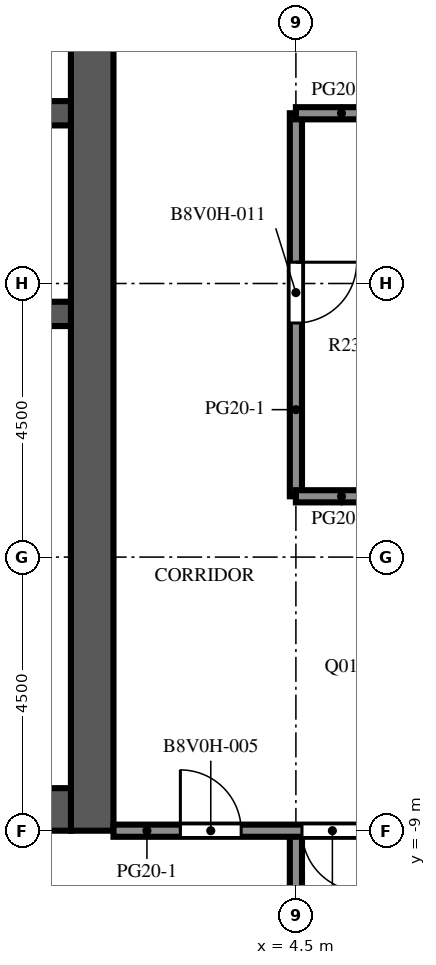
"""IFC4 building model, lengths in metres.
Left out: names, types, materials, properties, quantities, classifications, styles, units other than length and angle.
Written with IfcOpenShell. Run it as: python <this file> out.ifc"""

import sys

from ifc_helpers import new_model, si_unit, direction, frame, frame_2d, origin, place, context, subcontext, project, spatial, rectangle, extrude, element, fill, save


model = new_model("IFC4")
c1 = context("Model", 3, precision=1e-05, world=origin(), true_north=direction((0.0, 1.0)))
c2 = subcontext(c1, "Body", "Model", "MODEL_VIEW")
j1 = project(units=[si_unit("LENGTHUNIT", "METRE"), si_unit("PLANEANGLEUNIT", "RADIAN")], contexts=[c1])
p1 = place(None, origin())
s1 = spatial("IfcSite", under=j1, at=p1, CompositionType="ELEMENT")
p2 = place(p1, origin())
s2 = spatial("IfcBuilding", under=s1, at=p2, CompositionType="ELEMENT")
p3 = place(p2, frame((0.0, 0.0, 266.3)))
s3 = spatial("IfcBuildingStorey", under=s2, at=p3, CompositionType="ELEMENT", Elevation=266.3)
p4 = place(p3, frame((1.15, -9.0, 0.0), z_axis=(0.0, 0.0, 1.0), x_axis=(0.0, 1.0, 0.0)))
e1 = element("IfcWall", 1, at=p4, inside=s3, PredefinedType="SHEAR", context=c2, shape_type="SweptSolid", body=[
    extrude(rectangle(XDim=27.5, YDim=0.7, at=frame_2d((13.75, 0.0))), origin(), (0.0, 0.0, 1.0), 4.1),
])
p5 = place(p4, frame((12.55, 0.0, 0.0)))
e2 = element("IfcOpeningElement", 2, at=p5, cuts=e1, PredefinedType="OPENING", context=c2, shape_type="SweptSolid", body=[
    extrude(rectangle(XDim=2.4, YDim=2.4, at=frame_2d((1.2, 1.2))), frame((0.0, 0.36, 0.0), z_axis=(0.0, -1.0, 0.0), x_axis=(1.0, 0.0, 0.0)), (0.0, 0.0, 1.0), 0.72),
])
p6 = place(p4, frame((3.788, 0.0, 0.0)))
e3 = element("IfcOpeningElement", 3, at=p6, cuts=e1, PredefinedType="OPENING", context=c2, shape_type="SweptSolid", body=[
    extrude(rectangle(XDim=0.968, YDim=2.1, at=frame_2d((0.484, 1.05))), frame((0.0, 0.36, 0.0), z_axis=(0.0, -1.0, 0.0), x_axis=(1.0, 0.0, 0.0)), (0.0, 0.0, 1.0), 0.72),
])
p7 = place(p4, frame((23.54, 0.0, 0.0)))
e4 = element("IfcOpeningElement", 4, at=p7, cuts=e1, PredefinedType="OPENING", context=c2, shape_type="SweptSolid", body=[
    extrude(rectangle(XDim=1.2, YDim=2.1, at=frame_2d((0.6, 1.05))), frame((0.0, 0.36, 0.0), z_axis=(0.0, -1.0, 0.0), x_axis=(1.0, 0.0, 0.0)), (0.0, 0.0, 1.0), 0.72),
])
p8 = place(p3, frame((-9.8, -8.65, 0.0), z_axis=(0.0, 0.0, 1.0), x_axis=(1.0, 0.0, 0.0)))
e5 = element("IfcWall", 5, at=p8, inside=s3, PredefinedType="SHEAR", context=c2, shape_type="SweptSolid", body=[
    extrude(rectangle(XDim=10.6, YDim=0.7, at=frame_2d((5.3, 0.0))), origin(), (0.0, 0.0, 1.0), 4.1),
])
p9 = place(p3, frame((-9.8, -0.5, 0.0), z_axis=(0.0, 0.0, 1.0), x_axis=(1.0, 0.0, 0.0)))
e6 = element("IfcWall", 6, at=p9, inside=s3, PredefinedType="SHEAR", context=c2, shape_type="SweptSolid", body=[
    extrude(rectangle(XDim=10.6, YDim=0.4, at=frame_2d((5.3, 0.0))), origin(), (0.0, 0.0, 1.0), 4.1),
])
p10 = place(p3, frame((-9.8, 2.8, 0.0), z_axis=(0.0, 0.0, 1.0), x_axis=(1.0, 0.0, 0.0)))
e7 = element("IfcWall", 7, at=p10, inside=s3, PredefinedType="SHEAR", context=c2, shape_type="SweptSolid", body=[
    extrude(rectangle(XDim=10.6, YDim=0.4, at=frame_2d((5.3, 0.0))), origin(), (0.0, 0.0, 1.0), 4.1),
])
p11 = place(p10, frame((0.688, 0.0, 0.0)))
e8 = element("IfcOpeningElement", 8, at=p11, cuts=e7, PredefinedType="OPENING", context=c2, shape_type="SweptSolid", body=[
    extrude(rectangle(XDim=1.1, YDim=2.1, at=frame_2d((0.55, 1.05))), frame((0.0, 0.21, 0.0), z_axis=(0.0, -1.0, 0.0), x_axis=(1.0, 0.0, 0.0)), (0.0, 0.0, 1.0), 0.42),
])
p12 = place(p10, frame((3.438, 0.0, 0.0)))
e9 = element("IfcOpeningElement", 9, at=p12, cuts=e7, PredefinedType="OPENING", context=c2, shape_type="SweptSolid", body=[
    extrude(rectangle(XDim=1.1, YDim=2.1, at=frame_2d((0.55, 1.05))), frame((0.0, 0.21, 0.0), z_axis=(0.0, -1.0, 0.0), x_axis=(1.0, 0.0, 0.0)), (0.0, 0.0, 1.0), 0.42),
])
p13 = place(p10, frame((6.113, 0.0, 0.0)))
e10 = element("IfcOpeningElement", 10, at=p13, cuts=e7, PredefinedType="OPENING", context=c2, shape_type="SweptSolid", body=[
    extrude(rectangle(XDim=1.0, YDim=2.1, at=frame_2d((0.5, 1.05))), frame((0.0, 0.21, 0.0), z_axis=(0.0, -1.0, 0.0), x_axis=(1.0, 0.0, 0.0)), (0.0, 0.0, 1.0), 0.42),
])
p14 = place(p10, frame((8.863, 0.0, 0.0)))
e11 = element("IfcOpeningElement", 11, at=p14, cuts=e7, PredefinedType="OPENING", context=c2, shape_type="SweptSolid", body=[
    extrude(rectangle(XDim=1.0, YDim=2.1, at=frame_2d((0.5, 1.05))), frame((0.0, 0.21, 0.0), z_axis=(0.0, -1.0, 0.0), x_axis=(1.0, 0.0, 0.0)), (0.0, 0.0, 1.0), 0.42),
])
p15 = place(p3, frame((-4.3, -5.412, 0.0), z_axis=(0.0, 0.0, 1.0), x_axis=(1.0, 0.0, 0.0)))
e12 = element("IfcWall", 12, at=p15, inside=s3, PredefinedType="PARTITIONING", context=c2, shape_type="SweptSolid", body=[
    extrude(rectangle(XDim=5.1, YDim=0.1, at=frame_2d((2.55, 0.0))), origin(), (0.0, 0.0, 1.0), 3.65),
])
p16 = place(p15, frame((2.05, 0.0, 0.0)))
e13 = element("IfcOpeningElement", 13, at=p16, cuts=e12, PredefinedType="OPENING", context=c2, shape_type="SweptSolid", body=[
    extrude(rectangle(XDim=1.0, YDim=2.1, at=frame_2d((0.5, 1.05))), frame((0.0, 0.06, 0.0), z_axis=(0.0, -1.0, 0.0), x_axis=(1.0, 0.0, 0.0)), (0.0, 0.0, 1.0), 0.12),
])
p17 = place(p3, frame((-2.362, -4.044, 0.0), z_axis=(0.0, 0.0, 1.0), x_axis=(1.0, 0.0, 0.0)))
e14 = element("IfcWall", 14, at=p17, inside=s3, PredefinedType="PARTITIONING", context=c2, shape_type="SweptSolid", body=[
    extrude(rectangle(XDim=3.162, YDim=0.1, at=frame_2d((1.581, 0.0))), origin(), (0.0, 0.0, 1.0), 3.65),
])
p18 = place(p17, frame((1.081, 0.0, 0.0)))
e15 = element("IfcOpeningElement", 15, at=p18, cuts=e14, PredefinedType="OPENING", context=c2, shape_type="SweptSolid", body=[
    extrude(rectangle(XDim=1.0, YDim=2.1, at=frame_2d((0.5, 1.05))), frame((0.0, 0.06, 0.0), z_axis=(0.0, -1.0, 0.0), x_axis=(1.0, 0.0, 0.0)), (0.0, 0.0, 1.0), 0.12),
])
p19 = place(p3, frame((4.5, -17.6, 0.0), z_axis=(0.0, 0.0, 1.0), x_axis=(0.0, 1.0, 0.0)))
e16 = element("IfcWall", 16, at=p19, inside=s3, PredefinedType="PARTITIONING", context=c2, shape_type="SweptSolid", body=[
    extrude(rectangle(XDim=8.6, YDim=0.2, at=frame_2d((4.3, 0.0))), origin(), (0.0, 0.0, 1.0), 3.65),
])
p20 = place(p3, frame((4.5, 2.8, 0.0), z_axis=(0.0, 0.0, 1.0), x_axis=(0.0, -1.0, 0.0)))
e17 = element("IfcWall", 17, at=p20, inside=s3, PredefinedType="PARTITIONING", context=c2, shape_type="SweptSolid", body=[
    extrude(rectangle(XDim=6.3, YDim=0.2, at=frame_2d((3.15, 0.0))), origin(), (0.0, 0.0, 1.0), 3.65),
])
p21 = place(p20, frame((2.45, 0.0, 0.0)))
e18 = element("IfcOpeningElement", 18, at=p21, cuts=e17, PredefinedType="OPENING", context=c2, shape_type="SweptSolid", body=[
    extrude(rectangle(XDim=1.0, YDim=2.1, at=frame_2d((0.5, 1.05))), frame((0.0, 0.11, 0.0), z_axis=(0.0, -1.0, 0.0), x_axis=(1.0, 0.0, 0.0)), (0.0, 0.0, 1.0), 0.22),
])
p22 = place(p3, frame((6.0, -9.0, 0.0), z_axis=(0.0, 0.0, 1.0), x_axis=(-1.0, 0.0, 0.0)))
e19 = element("IfcWall", 19, at=p22, inside=s3, PredefinedType="PARTITIONING", context=c2, shape_type="SweptSolid", body=[
    extrude(rectangle(XDim=4.5, YDim=0.2, at=frame_2d((2.25, 0.0))), origin(), (0.0, 0.0, 1.0), 3.65),
])
p23 = place(p22, frame((2.4, 0.0, 0.0)))
e20 = element("IfcOpeningElement", 20, at=p23, cuts=e19, PredefinedType="OPENING", context=c2, shape_type="SweptSolid", body=[
    extrude(rectangle(XDim=1.0, YDim=2.1, at=frame_2d((0.5, 1.05))), frame((0.0, 0.11, 0.0), z_axis=(0.0, -1.0, 0.0), x_axis=(1.0, 0.0, 0.0)), (0.0, 0.0, 1.0), 0.22),
])
p24 = place(p22, frame((0.4, 0.0, 0.0)))
e21 = element("IfcOpeningElement", 21, at=p24, cuts=e19, PredefinedType="OPENING", context=c2, shape_type="SweptSolid", body=[
    extrude(rectangle(XDim=1.0, YDim=2.1, at=frame_2d((0.5, 1.05))), frame((0.0, 0.11, 0.0), z_axis=(0.0, -1.0, 0.0), x_axis=(1.0, 0.0, 0.0)), (0.0, 0.0, 1.0), 0.22),
])
for number, where, z_axis, x_axis in (
    (22, (4.5, -3.5, 0.0), (0.0, 0.0, 1.0), (1.0, 0.0, 0.0)),
    (23, (4.5, 2.8, 0.0), (0.0, 0.0, 1.0), (1.0, 0.0, 0.0)),
):
    element("IfcWall", number, at=place(p3, frame(where, z_axis=z_axis, x_axis=x_axis)), inside=s3, PredefinedType="PARTITIONING", context=c2, shape_type="SweptSolid", body=[
        extrude(rectangle(XDim=1.5, YDim=0.2, at=frame_2d((0.75, 0.0))), origin(), (0.0, 0.0, 1.0), 3.65),
    ])
p25 = place(p5, origin())
e24 = element("IfcDoor", 24, at=p25, inside=s3, OperationType="DOUBLE_DOOR_DOUBLE_SWING", PredefinedType="DOOR", context=c2, shape_type="SweptSolid", body=[
    extrude(rectangle(XDim=2.4, YDim=2.4, at=frame_2d((1.2, 1.2))), frame((0.0, 0.025, 0.0), z_axis=(0.0, -1.0, 0.0), x_axis=(1.0, 0.0, 0.0)), (0.0, 0.0, 1.0), 0.05),
])
fill(e2, e24)
p26 = place(p6, origin())
e25 = element("IfcDoor", 25, at=p26, inside=s3, OperationType="SINGLE_SWING_LEFT", PredefinedType="DOOR", context=c2, shape_type="SweptSolid", body=[
    extrude(rectangle(XDim=0.968, YDim=2.1, at=frame_2d((0.484, 1.05))), frame((0.0, 0.325, 0.0), z_axis=(0.0, -1.0, 0.0), x_axis=(1.0, 0.0, 0.0)), (0.0, 0.0, 1.0), 0.05),
])
fill(e3, e25)
p27 = place(p23, origin())
e26 = element("IfcDoor", 26, at=p27, inside=s3, OperationType="SINGLE_SWING_RIGHT", PredefinedType="DOOR", context=c2, shape_type="SweptSolid", body=[
    extrude(rectangle(XDim=1.0, YDim=2.1, at=frame_2d((0.5, 1.05))), frame((0.0, 0.025, 0.0), z_axis=(0.0, -1.0, 0.0), x_axis=(1.0, 0.0, 0.0)), (0.0, 0.0, 1.0), 0.05),
])
fill(e20, e26)
p28 = place(p24, origin())
e27 = element("IfcDoor", 27, at=p28, inside=s3, OperationType="SINGLE_SWING_LEFT", PredefinedType="DOOR", context=c2, shape_type="SweptSolid", body=[
    extrude(rectangle(XDim=1.0, YDim=2.1, at=frame_2d((0.5, 1.05))), frame((0.0, 0.025, 0.0), z_axis=(0.0, -1.0, 0.0), x_axis=(1.0, 0.0, 0.0)), (0.0, 0.0, 1.0), 0.05),
])
fill(e21, e27)
p29 = place(p21, origin())
e28 = element("IfcDoor", 28, at=p29, inside=s3, OperationType="SINGLE_SWING_LEFT", PredefinedType="DOOR", context=c2, shape_type="SweptSolid", body=[
    extrude(rectangle(XDim=1.0, YDim=2.1, at=frame_2d((0.5, 1.05))), frame((0.0, 0.025, 0.0), z_axis=(0.0, -1.0, 0.0), x_axis=(1.0, 0.0, 0.0)), (0.0, 0.0, 1.0), 0.05),
])
fill(e18, e28)
save(model, sys.argv[1])
